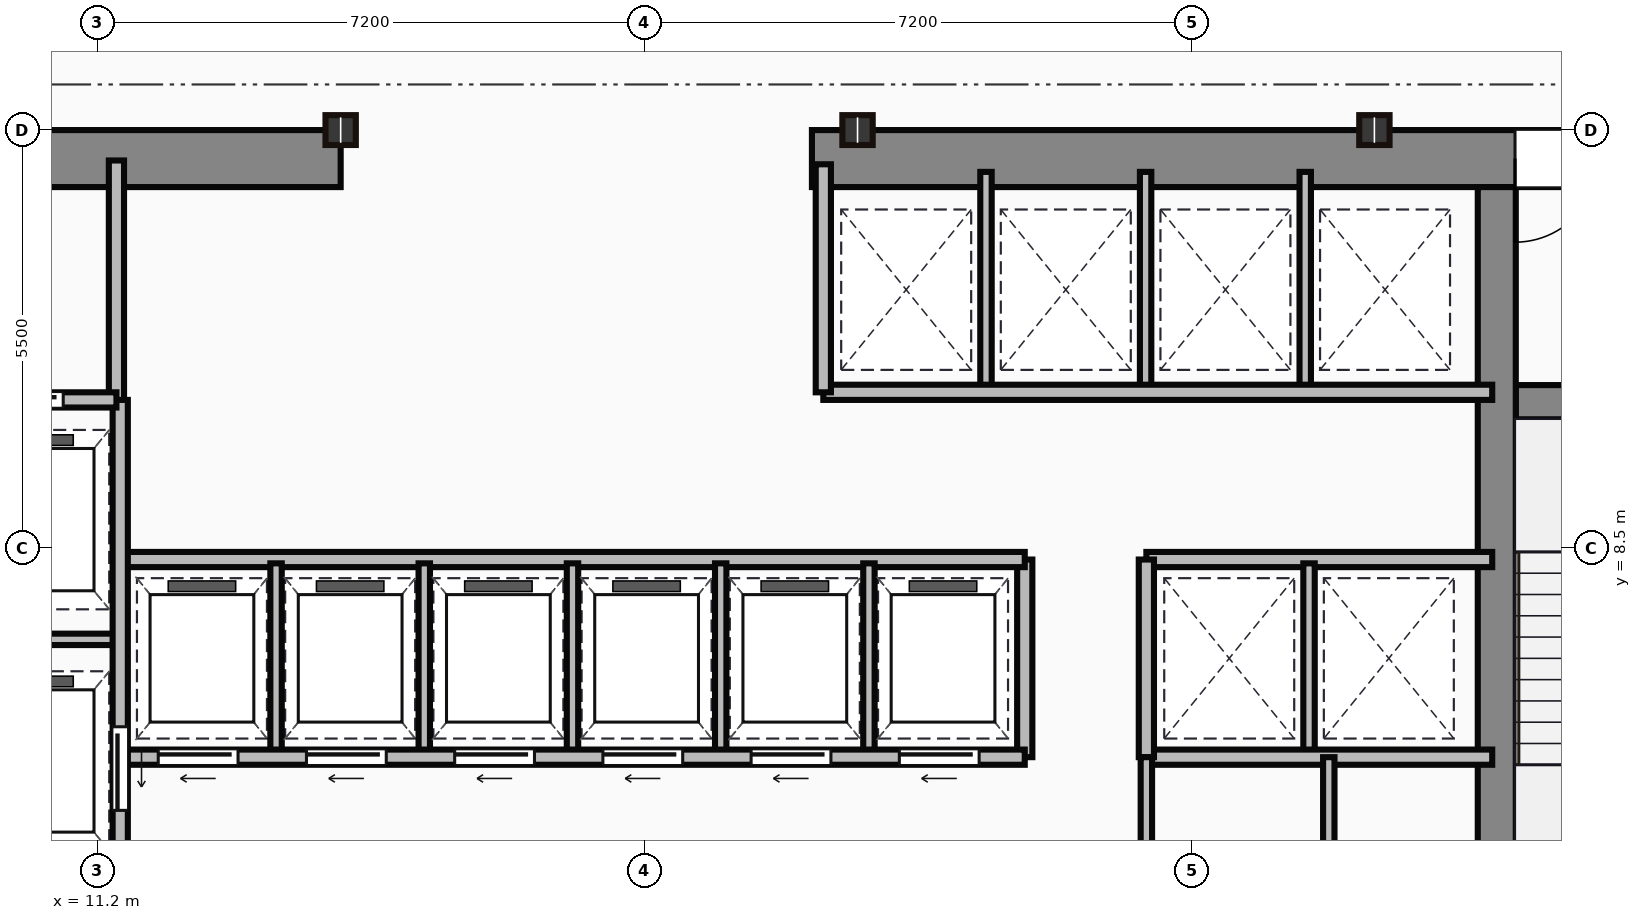
"""IFC4 building model, lengths in metres.
Left out: names, types, materials, properties, quantities, classifications, styles, units other than length and angle.
Written with IfcOpenShell. Run it as: python <this file> out.ifc"""

import sys

from ifc_helpers import new_model, si_unit, direction, frame, frame_2d, origin, origin_2d, place, context, subcontext, project, spatial, rectangle, i_section, extrude, source, transform, mapped, element, fill, save


model = new_model("IFC4")
c1 = context("Model", 3, precision=1e-05, world=origin(), true_north=direction((0.0, 1.0)))
c2 = subcontext(c1, "Body", "Model", "MODEL_VIEW")
j1 = project(units=[si_unit("LENGTHUNIT", "METRE"), si_unit("PLANEANGLEUNIT", "RADIAN")], contexts=[c1])
p1 = place(None, origin())
s1 = spatial("IfcSite", under=j1, at=p1, CompositionType="ELEMENT")
p2 = place(p1, origin())
s2 = spatial("IfcBuilding", under=s1, at=p2, CompositionType="ELEMENT")
p3 = place(p2, frame((0.0, 0.0, 99.6)))
s3 = spatial("IfcBuildingStorey", under=s2, at=p3, CompositionType="ELEMENT", Elevation=99.6)
m1 = source(origin(), c2, "Body", "SweptSolid", [
    extrude(rectangle(XDim=9.1, YDim=0.75, at=frame_2d((4.55, 0.0))), origin(), (0.0, 0.0, 1.0), 3.65),
])
p4 = place(p3, frame((5.3, 13.625, 0.0), z_axis=(0.0, 0.0, 1.0), x_axis=(1.0, 0.0, 0.0)))
e1 = element("IfcWall", 1, at=p4, inside=s3, PredefinedType="SHEAR", context=c2, shape_type="MappedRepresentation", body=[
    mapped(m1, transform((0.0, 0.0, 0.0))),
])
p5 = place(p4, frame((4.1, 0.0, 0.0)))
e2 = element("IfcOpeningElement", 2, at=p5, cuts=e1, PredefinedType="OPENING", context=c2, shape_type="SweptSolid", body=[
    extrude(rectangle(XDim=1.1, YDim=2.15, at=frame_2d((0.55, 1.075))), frame((0.0, 0.385, 0.0), z_axis=(0.0, -1.0, 0.0), x_axis=(1.0, 0.0, 0.0)), (0.0, 0.0, 1.0), 0.77),
])
m2 = source(origin(), c2, "Body", "SweptSolid", [
    extrude(rectangle(XDim=12.6, YDim=0.75, at=frame_2d((6.3, 0.0))), origin(), (0.0, 0.0, 1.0), 3.65),
])
p6 = place(p3, frame((20.6, 13.625, 0.0), z_axis=(0.0, 0.0, 1.0), x_axis=(1.0, 0.0, 0.0)))
e3 = element("IfcWall", 3, at=p6, inside=s3, PredefinedType="SHEAR", context=c2, shape_type="MappedRepresentation", body=[
    mapped(m2, transform((0.0, 0.0, 0.0))),
])
p7 = place(p6, frame((9.25, 0.0, 0.0)))
e4 = element("IfcOpeningElement", 4, at=p7, cuts=e3, PredefinedType="OPENING", context=c2, shape_type="SweptSolid", body=[
    extrude(rectangle(XDim=1.1, YDim=2.15, at=frame_2d((0.55, 1.075))), frame((0.0, 0.385, 0.0), z_axis=(0.0, -1.0, 0.0), x_axis=(1.0, 0.0, 0.0)), (0.0, 0.0, 1.0), 0.77),
])
m3 = source(origin(), c2, "Body", "SweptSolid", [
    extrude(rectangle(XDim=12.35, YDim=0.5, at=frame_2d((6.175, 0.0))), origin(), (0.0, 0.0, 1.0), 3.65),
])
p8 = place(p3, frame((29.61, 0.9, 0.0), z_axis=(0.0, 0.0, 1.0), x_axis=(0.0, 1.0, 0.0)))
e5 = element("IfcWall", 5, at=p8, inside=s3, PredefinedType="SHEAR", context=c2, shape_type="MappedRepresentation", body=[
    mapped(m3, transform((0.0, 0.0, 0.0))),
])
m4 = source(origin(), c2, "Body", "SweptSolid", [
    extrude(rectangle(XDim=3.39, YDim=0.45, at=frame_2d((1.695, 0.0))), origin(), (0.0, 0.0, 1.0), 3.65),
])
p9 = place(p3, frame((29.86, 10.42, 0.0), z_axis=(0.0, 0.0, 1.0), x_axis=(1.0, 0.0, 0.0)))
e6 = element("IfcWall", 6, at=p9, inside=s3, PredefinedType="SHEAR", context=c2, shape_type="MappedRepresentation", body=[
    mapped(m4, transform((0.0, 0.0, 0.0))),
])
p10 = place(p9, frame((1.1, 0.0, 0.0)))
e7 = element("IfcOpeningElement", 7, at=p10, cuts=e6, PredefinedType="OPENING", context=c2, shape_type="SweptSolid", body=[
    extrude(rectangle(XDim=1.1, YDim=2.15, at=frame_2d((0.55, 1.075))), frame((0.0, 0.235, 0.0), z_axis=(0.0, -1.0, 0.0), x_axis=(1.0, 0.0, 0.0)), (0.0, 0.0, 1.0), 0.47),
])
m5 = source(origin(), c2, "Body", "SweptSolid", [
    extrude(i_section(OverallWidth=0.399, OverallDepth=0.393, WebThickness=0.023, FlangeThickness=0.037, at=origin_2d()), origin(), (0.0, 0.0, 1.0), 3.65),
])
for number, where, z_axis, x_axis in (
    (8, (14.4, 14.0, 0.0), (0.0, 0.0, 1.0), (1.0, 0.0, 0.0)),
    (9, (21.2, 14.0, 0.0), (0.0, 0.0, 1.0), (1.0, 0.0, 0.0)),
    (10, (28.0, 14.0, 0.0), (0.0, 0.0, 1.0), (1.0, 0.0, 0.0)),
):
    element("IfcColumn", number, at=place(p3, frame(where, z_axis=z_axis, x_axis=x_axis)), inside=s3, PredefinedType="COLUMN", context=c2, shape_type="MappedRepresentation", body=[
        mapped(m5, transform((0.0, 0.0, 0.0))),
    ])
m6 = source(origin(), c2, "Body", "SweptSolid", [
    extrude(rectangle(XDim=3.18, YDim=0.2, at=frame_2d((1.59, 0.0))), origin(), (0.0, 0.0, 1.0), 3.4),
])
p11 = place(p3, frame((11.45, 10.42, 0.0), z_axis=(0.0, 0.0, 1.0), x_axis=(0.0, 1.0, 0.0)))
e11 = element("IfcWall", 11, at=p11, inside=s3, PredefinedType="PARTITIONING", context=c2, shape_type="MappedRepresentation", body=[
    mapped(m6, transform((0.0, 0.0, 0.0))),
])
m7 = source(origin(), c2, "Body", "SweptSolid", [
    extrude(rectangle(XDim=2.35, YDim=0.2, at=frame_2d((1.175, 0.0))), origin(), (0.0, 0.0, 1.0), 3.4),
])
p12 = place(p3, frame((9.1, 10.45, 0.0), z_axis=(0.0, 0.0, 1.0), x_axis=(1.0, 0.0, 0.0)))
e12 = element("IfcWall", 12, at=p12, inside=s3, PredefinedType="PARTITIONING", context=c2, shape_type="MappedRepresentation", body=[
    mapped(m7, transform((0.0, 0.0, 0.0))),
])
p13 = place(p12, frame((0.55, 0.0, 0.0)))
e13 = element("IfcOpeningElement", 13, at=p13, cuts=e12, PredefinedType="OPENING", context=c2, shape_type="SweptSolid", body=[
    extrude(rectangle(XDim=1.1, YDim=2.15, at=frame_2d((0.55, 1.075))), frame((0.0, 0.11, 0.0), z_axis=(0.0, -1.0, 0.0), x_axis=(1.0, 0.0, 0.0)), (0.0, 0.0, 1.0), 0.22),
])
m8 = source(origin(), c2, "Body", "SweptSolid", [
    extrude(rectangle(XDim=9.6, YDim=0.2, at=frame_2d((4.8, 0.0))), origin(), (0.0, 0.0, 1.0), 3.4),
])
p14 = place(p3, frame((11.5, 0.85, 0.0), z_axis=(0.0, 0.0, 1.0), x_axis=(0.0, 1.0, 0.0)))
e14 = element("IfcWall", 14, at=p14, inside=s3, PredefinedType="PARTITIONING", context=c2, shape_type="MappedRepresentation", body=[
    mapped(m8, transform((0.0, 0.0, 0.0))),
])
p15 = place(p14, frame((4.2, 0.0, 0.0)))
e15 = element("IfcOpeningElement", 15, at=p15, cuts=e14, PredefinedType="OPENING", context=c2, shape_type="SweptSolid", body=[
    extrude(rectangle(XDim=1.1, YDim=2.15, at=frame_2d((0.55, 1.075))), frame((0.0, 0.11, 0.0), z_axis=(0.0, -1.0, 0.0), x_axis=(1.0, 0.0, 0.0)), (0.0, 0.0, 1.0), 0.22),
])
p16 = place(p14, frame((0.9, 0.0, 0.0)))
e16 = element("IfcOpeningElement", 16, at=p16, cuts=e14, PredefinedType="OPENING", context=c2, shape_type="SweptSolid", body=[
    extrude(rectangle(XDim=1.2, YDim=2.15, at=frame_2d((0.6, 1.075))), frame((0.0, 0.11, 0.0), z_axis=(0.0, -1.0, 0.0), x_axis=(1.0, 0.0, 0.0)), (0.0, 0.0, 1.0), 0.22),
])
m9 = source(origin(), c2, "Body", "SweptSolid", [
    extrude(rectangle(XDim=2.4, YDim=0.15, at=frame_2d((1.2, 0.0))), origin(), (0.0, 0.0, 1.0), 3.4),
])
p17 = place(p3, frame((9.1, 7.3, 0.0), z_axis=(0.0, 0.0, 1.0), x_axis=(1.0, 0.0, 0.0)))
e17 = element("IfcWall", 17, at=p17, inside=s3, PredefinedType="PARTITIONING", context=c2, shape_type="MappedRepresentation", body=[
    mapped(m9, transform((0.0, 0.0, 0.0))),
])
m10 = source(origin(), c2, "Body", "SweptSolid", [
    extrude(rectangle(XDim=11.85, YDim=0.2, at=frame_2d((5.925, 0.0))), origin(), (0.0, 0.0, 1.0), 3.4),
])
p18 = place(p3, frame((11.55, 5.75, 0.0), z_axis=(0.0, 0.0, 1.0), x_axis=(1.0, 0.0, 0.0)))
e18 = element("IfcWall", 18, at=p18, inside=s3, PredefinedType="PARTITIONING", context=c2, shape_type="MappedRepresentation", body=[
    mapped(m10, transform((0.0, 0.0, 0.0))),
])
p19 = place(p18, frame((0.45, 0.0, 0.0)))
e19 = element("IfcOpeningElement", 19, at=p19, cuts=e18, PredefinedType="OPENING", context=c2, shape_type="SweptSolid", body=[
    extrude(rectangle(XDim=1.05, YDim=2.15, at=frame_2d((0.525, 1.075))), frame((0.0, 0.11, 0.0), z_axis=(0.0, -1.0, 0.0), x_axis=(1.0, 0.0, 0.0)), (0.0, 0.0, 1.0), 0.22),
])
p20 = place(p18, frame((2.4, 0.0, 0.0)))
e20 = element("IfcOpeningElement", 20, at=p20, cuts=e18, PredefinedType="OPENING", context=c2, shape_type="SweptSolid", body=[
    extrude(rectangle(XDim=1.05, YDim=2.15, at=frame_2d((0.525, 1.075))), frame((0.0, 0.11, 0.0), z_axis=(0.0, -1.0, 0.0), x_axis=(1.0, 0.0, 0.0)), (0.0, 0.0, 1.0), 0.22),
])
p21 = place(p18, frame((4.35, 0.0, 0.0)))
e21 = element("IfcOpeningElement", 21, at=p21, cuts=e18, PredefinedType="OPENING", context=c2, shape_type="SweptSolid", body=[
    extrude(rectangle(XDim=1.05, YDim=2.15, at=frame_2d((0.525, 1.075))), frame((0.0, 0.11, 0.0), z_axis=(0.0, -1.0, 0.0), x_axis=(1.0, 0.0, 0.0)), (0.0, 0.0, 1.0), 0.22),
])
p22 = place(p18, frame((6.3, 0.0, 0.0)))
e22 = element("IfcOpeningElement", 22, at=p22, cuts=e18, PredefinedType="OPENING", context=c2, shape_type="SweptSolid", body=[
    extrude(rectangle(XDim=1.05, YDim=2.15, at=frame_2d((0.525, 1.075))), frame((0.0, 0.11, 0.0), z_axis=(0.0, -1.0, 0.0), x_axis=(1.0, 0.0, 0.0)), (0.0, 0.0, 1.0), 0.22),
])
p23 = place(p18, frame((8.25, 0.0, 0.0)))
e23 = element("IfcOpeningElement", 23, at=p23, cuts=e18, PredefinedType="OPENING", context=c2, shape_type="SweptSolid", body=[
    extrude(rectangle(XDim=1.05, YDim=2.15, at=frame_2d((0.525, 1.075))), frame((0.0, 0.11, 0.0), z_axis=(0.0, -1.0, 0.0), x_axis=(1.0, 0.0, 0.0)), (0.0, 0.0, 1.0), 0.22),
])
p24 = place(p18, frame((10.2, 0.0, 0.0)))
e24 = element("IfcOpeningElement", 24, at=p24, cuts=e18, PredefinedType="OPENING", context=c2, shape_type="SweptSolid", body=[
    extrude(rectangle(XDim=1.05, YDim=2.15, at=frame_2d((0.525, 1.075))), frame((0.0, 0.11, 0.0), z_axis=(0.0, -1.0, 0.0), x_axis=(1.0, 0.0, 0.0)), (0.0, 0.0, 1.0), 0.22),
])
p25 = place(p3, frame((11.55, 8.35, 0.0), z_axis=(0.0, 0.0, 1.0), x_axis=(1.0, 0.0, 0.0)))
e25 = element("IfcWall", 25, at=p25, inside=s3, PredefinedType="PARTITIONING", context=c2, shape_type="MappedRepresentation", body=[
    mapped(m10, transform((0.0, 0.0, 0.0))),
])
m11 = source(origin(), c2, "Body", "SweptSolid", [
    extrude(rectangle(XDim=2.6, YDim=0.2, at=frame_2d((1.3, 0.0))), origin(), (0.0, 0.0, 1.0), 3.4),
])
p26 = place(p3, frame((23.4, 5.75, 0.0), z_axis=(0.0, 0.0, 1.0), x_axis=(0.0, 1.0, 0.0)))
e26 = element("IfcWall", 26, at=p26, inside=s3, PredefinedType="PARTITIONING", context=c2, shape_type="MappedRepresentation", body=[
    mapped(m11, transform((0.0, 0.0, 0.0))),
])
m12 = source(origin(), c2, "Body", "SweptSolid", [
    extrude(rectangle(XDim=2.5, YDim=0.15, at=frame_2d((1.25, 0.0))), origin(), (0.0, 0.0, 1.0), 3.4),
])
for number, where, z_axis, x_axis in (
    (27, (13.55, 5.8, 0.0), (0.0, 0.0, 1.0), (0.0, 1.0, 0.0)),
    (28, (15.5, 5.8, 0.0), (0.0, 0.0, 1.0), (0.0, 1.0, 0.0)),
    (29, (17.45, 5.8, 0.0), (0.0, 0.0, 1.0), (0.0, 1.0, 0.0)),
    (30, (19.4, 5.8, 0.0), (0.0, 0.0, 1.0), (0.0, 1.0, 0.0)),
    (31, (21.35, 5.8, 0.0), (0.0, 0.0, 1.0), (0.0, 1.0, 0.0)),
):
    element("IfcWall", number, at=place(p3, frame(where, z_axis=z_axis, x_axis=x_axis)), inside=s3, PredefinedType="PARTITIONING", context=c2, shape_type="MappedRepresentation", body=[
        mapped(m12, transform((0.0, 0.0, 0.0))),
    ])
m13 = source(origin(), c2, "Body", "SweptSolid", [
    extrude(rectangle(XDim=8.8, YDim=0.2, at=frame_2d((4.4, 0.0))), origin(), (0.0, 0.0, 1.0), 3.4),
])
p27 = place(p3, frame((20.75, 10.55, 0.0), z_axis=(0.0, 0.0, 1.0), x_axis=(1.0, 0.0, 0.0)))
e32 = element("IfcWall", 32, at=p27, inside=s3, PredefinedType="PARTITIONING", context=c2, shape_type="MappedRepresentation", body=[
    mapped(m13, transform((0.0, 0.0, 0.0))),
])
m14 = source(origin(), c2, "Body", "SweptSolid", [
    extrude(rectangle(XDim=3.0, YDim=0.2, at=frame_2d((1.5, 0.0))), origin(), (0.0, 0.0, 1.0), 3.4),
])
p28 = place(p3, frame((20.75, 10.55, 0.0), z_axis=(0.0, 0.0, 1.0), x_axis=(0.0, 1.0, 0.0)))
e33 = element("IfcWall", 33, at=p28, inside=s3, PredefinedType="PARTITIONING", context=c2, shape_type="MappedRepresentation", body=[
    mapped(m14, transform((0.0, 0.0, 0.0))),
])
m15 = source(origin(), c2, "Body", "SweptSolid", [
    extrude(rectangle(XDim=2.85, YDim=0.15, at=frame_2d((1.425, 0.0))), origin(), (0.0, 0.0, 1.0), 3.4),
])
for number, where, z_axis, x_axis in (
    (34, (22.89, 10.6, 0.0), (0.0, 0.0, 1.0), (0.0, 1.0, 0.0)),
    (35, (24.99, 10.6, 0.0), (0.0, 0.0, 1.0), (0.0, 1.0, 0.0)),
    (36, (27.09, 10.6, 0.0), (0.0, 0.0, 1.0), (0.0, 1.0, 0.0)),
):
    element("IfcWall", number, at=place(p3, frame(where, z_axis=z_axis, x_axis=x_axis)), inside=s3, PredefinedType="PARTITIONING", context=c2, shape_type="MappedRepresentation", body=[
        mapped(m15, transform((0.0, 0.0, 0.0))),
    ])
m16 = source(origin(), c2, "Body", "SweptSolid", [
    extrude(rectangle(XDim=4.55, YDim=0.2, at=frame_2d((2.275, 0.0))), origin(), (0.0, 0.0, 1.0), 3.4),
])
for number, where, z_axis, x_axis in (
    (37, (25.0, 8.35, 0.0), (0.0, 0.0, 1.0), (1.0, 0.0, 0.0)),
    (38, (25.0, 5.75, 0.0), (0.0, 0.0, 1.0), (1.0, 0.0, 0.0)),
):
    element("IfcWall", number, at=place(p3, frame(where, z_axis=z_axis, x_axis=x_axis)), inside=s3, PredefinedType="PARTITIONING", context=c2, shape_type="MappedRepresentation", body=[
        mapped(m16, transform((0.0, 0.0, 0.0))),
    ])
p29 = place(p3, frame((25.0, 5.75, 0.0), z_axis=(0.0, 0.0, 1.0), x_axis=(0.0, 1.0, 0.0)))
e39 = element("IfcWall", 39, at=p29, inside=s3, PredefinedType="PARTITIONING", context=c2, shape_type="MappedRepresentation", body=[
    mapped(m11, transform((0.0, 0.0, 0.0))),
])
p30 = place(p3, frame((27.14, 5.8, 0.0), z_axis=(0.0, 0.0, 1.0), x_axis=(0.0, 1.0, 0.0)))
e40 = element("IfcWall", 40, at=p30, inside=s3, PredefinedType="PARTITIONING", context=c2, shape_type="MappedRepresentation", body=[
    mapped(m12, transform((0.0, 0.0, 0.0))),
])
m17 = source(origin(), c2, "Body", "SweptSolid", [
    extrude(rectangle(XDim=4.9, YDim=0.15, at=frame_2d((2.45, 0.0))), origin(), (0.0, 0.0, 1.0), 3.4),
])
p31 = place(p3, frame((25.0, 0.85, 0.0), z_axis=(0.0, 0.0, 1.0), x_axis=(0.0, 1.0, 0.0)))
e41 = element("IfcWall", 41, at=p31, inside=s3, PredefinedType="PARTITIONING", context=c2, shape_type="MappedRepresentation", body=[
    mapped(m17, transform((0.0, 0.0, 0.0))),
])
p32 = place(p31, frame((2.5, 0.0, 0.0)))
e42 = element("IfcOpeningElement", 42, at=p32, cuts=e41, PredefinedType="OPENING", context=c2, shape_type="SweptSolid", body=[
    extrude(rectangle(XDim=0.95, YDim=2.15, at=frame_2d((0.475, 1.075))), frame((0.0, 0.085, 0.0), z_axis=(0.0, -1.0, 0.0), x_axis=(1.0, 0.0, 0.0)), (0.0, 0.0, 1.0), 0.17),
])
m18 = source(origin(), c2, "Body", "SweptSolid", [
    extrude(rectangle(XDim=3.4, YDim=0.15, at=frame_2d((1.7, 0.0))), origin(), (0.0, 0.0, 1.0), 3.4),
])
p33 = place(p3, frame((27.4, 2.35, 0.0), z_axis=(0.0, 0.0, 1.0), x_axis=(0.0, 1.0, 0.0)))
e43 = element("IfcWall", 43, at=p33, inside=s3, PredefinedType="PARTITIONING", context=c2, shape_type="MappedRepresentation", body=[
    mapped(m18, transform((0.0, 0.0, 0.0))),
])
p34 = place(p33, frame((1.1, 0.0, 0.0)))
e44 = element("IfcOpeningElement", 44, at=p34, cuts=e43, PredefinedType="OPENING", context=c2, shape_type="SweptSolid", body=[
    extrude(rectangle(XDim=0.85, YDim=2.1, at=frame_2d((0.425, 1.05))), frame((0.0, 0.085, 0.0), z_axis=(0.0, -1.0, 0.0), x_axis=(1.0, 0.0, 0.0)), (0.0, 0.0, 1.0), 0.17),
])
m19 = source(origin(), c2, "Body", "SweptSolid", [
    extrude(rectangle(XDim=1.1, YDim=2.15, at=frame_2d((0.55, 1.075))), frame((0.0, 0.025, 0.0), z_axis=(0.0, -1.0, 0.0), x_axis=(1.0, 0.0, 0.0)), (0.0, 0.0, 1.0), 0.05),
])
p35 = place(p7, origin())
e45 = element("IfcDoor", 45, at=p35, inside=s3, OperationType="SINGLE_SWING_LEFT", PredefinedType="DOOR", context=c2, shape_type="MappedRepresentation", body=[
    mapped(m19, transform((0.0, 0.0, 0.0))),
])
fill(e4, e45)
p36 = place(p13, origin())
e46 = element("IfcDoor", 46, at=p36, inside=s3, OperationType="SLIDING_TO_LEFT", PredefinedType="DOOR", context=c2, shape_type="MappedRepresentation", body=[
    mapped(m19, transform((0.0, 0.0, 0.0))),
])
fill(e13, e46)
p37 = place(p15, frame((1.1, 0.0, 0.0), z_axis=(0.0, 0.0, 1.0), x_axis=(-1.0, 0.0, 0.0)))
e47 = element("IfcDoor", 47, at=p37, inside=s3, OperationType="SLIDING_TO_LEFT", PredefinedType="DOOR", context=c2, shape_type="MappedRepresentation", body=[
    mapped(m19, transform((0.0, 0.0, 0.0))),
])
fill(e15, e47)
m20 = source(origin(), c2, "Body", "SweptSolid", [
    extrude(rectangle(XDim=1.05, YDim=2.15, at=frame_2d((0.525, 1.075))), frame((0.0, 0.025, 0.0), z_axis=(0.0, -1.0, 0.0), x_axis=(1.0, 0.0, 0.0)), (0.0, 0.0, 1.0), 0.05),
])
p38 = place(p19, frame((1.05, 0.0, 0.0), z_axis=(0.0, 0.0, 1.0), x_axis=(-1.0, 0.0, 0.0)))
e48 = element("IfcDoor", 48, at=p38, inside=s3, OperationType="SLIDING_TO_LEFT", PredefinedType="DOOR", context=c2, shape_type="MappedRepresentation", body=[
    mapped(m20, transform((0.0, 0.0, 0.0))),
])
fill(e19, e48)
p39 = place(p20, frame((1.05, 0.0, 0.0), z_axis=(0.0, 0.0, 1.0), x_axis=(-1.0, 0.0, 0.0)))
e49 = element("IfcDoor", 49, at=p39, inside=s3, OperationType="SLIDING_TO_LEFT", PredefinedType="DOOR", context=c2, shape_type="MappedRepresentation", body=[
    mapped(m20, transform((0.0, 0.0, 0.0))),
])
fill(e20, e49)
p40 = place(p21, frame((1.05, 0.0, 0.0), z_axis=(0.0, 0.0, 1.0), x_axis=(-1.0, 0.0, 0.0)))
e50 = element("IfcDoor", 50, at=p40, inside=s3, OperationType="SLIDING_TO_LEFT", PredefinedType="DOOR", context=c2, shape_type="MappedRepresentation", body=[
    mapped(m20, transform((0.0, 0.0, 0.0))),
])
fill(e21, e50)
p41 = place(p22, frame((1.05, 0.0, 0.0), z_axis=(0.0, 0.0, 1.0), x_axis=(-1.0, 0.0, 0.0)))
e51 = element("IfcDoor", 51, at=p41, inside=s3, OperationType="SLIDING_TO_LEFT", PredefinedType="DOOR", context=c2, shape_type="MappedRepresentation", body=[
    mapped(m20, transform((0.0, 0.0, 0.0))),
])
fill(e22, e51)
p42 = place(p23, frame((1.05, 0.0, 0.0), z_axis=(0.0, 0.0, 1.0), x_axis=(-1.0, 0.0, 0.0)))
e52 = element("IfcDoor", 52, at=p42, inside=s3, OperationType="SLIDING_TO_LEFT", PredefinedType="DOOR", context=c2, shape_type="MappedRepresentation", body=[
    mapped(m20, transform((0.0, 0.0, 0.0))),
])
fill(e23, e52)
p43 = place(p24, frame((1.05, 0.0, 0.0), z_axis=(0.0, 0.0, 1.0), x_axis=(-1.0, 0.0, 0.0)))
e53 = element("IfcDoor", 53, at=p43, inside=s3, OperationType="SLIDING_TO_LEFT", PredefinedType="DOOR", context=c2, shape_type="MappedRepresentation", body=[
    mapped(m20, transform((0.0, 0.0, 0.0))),
])
fill(e24, e53)
save(model, sys.argv[1])
